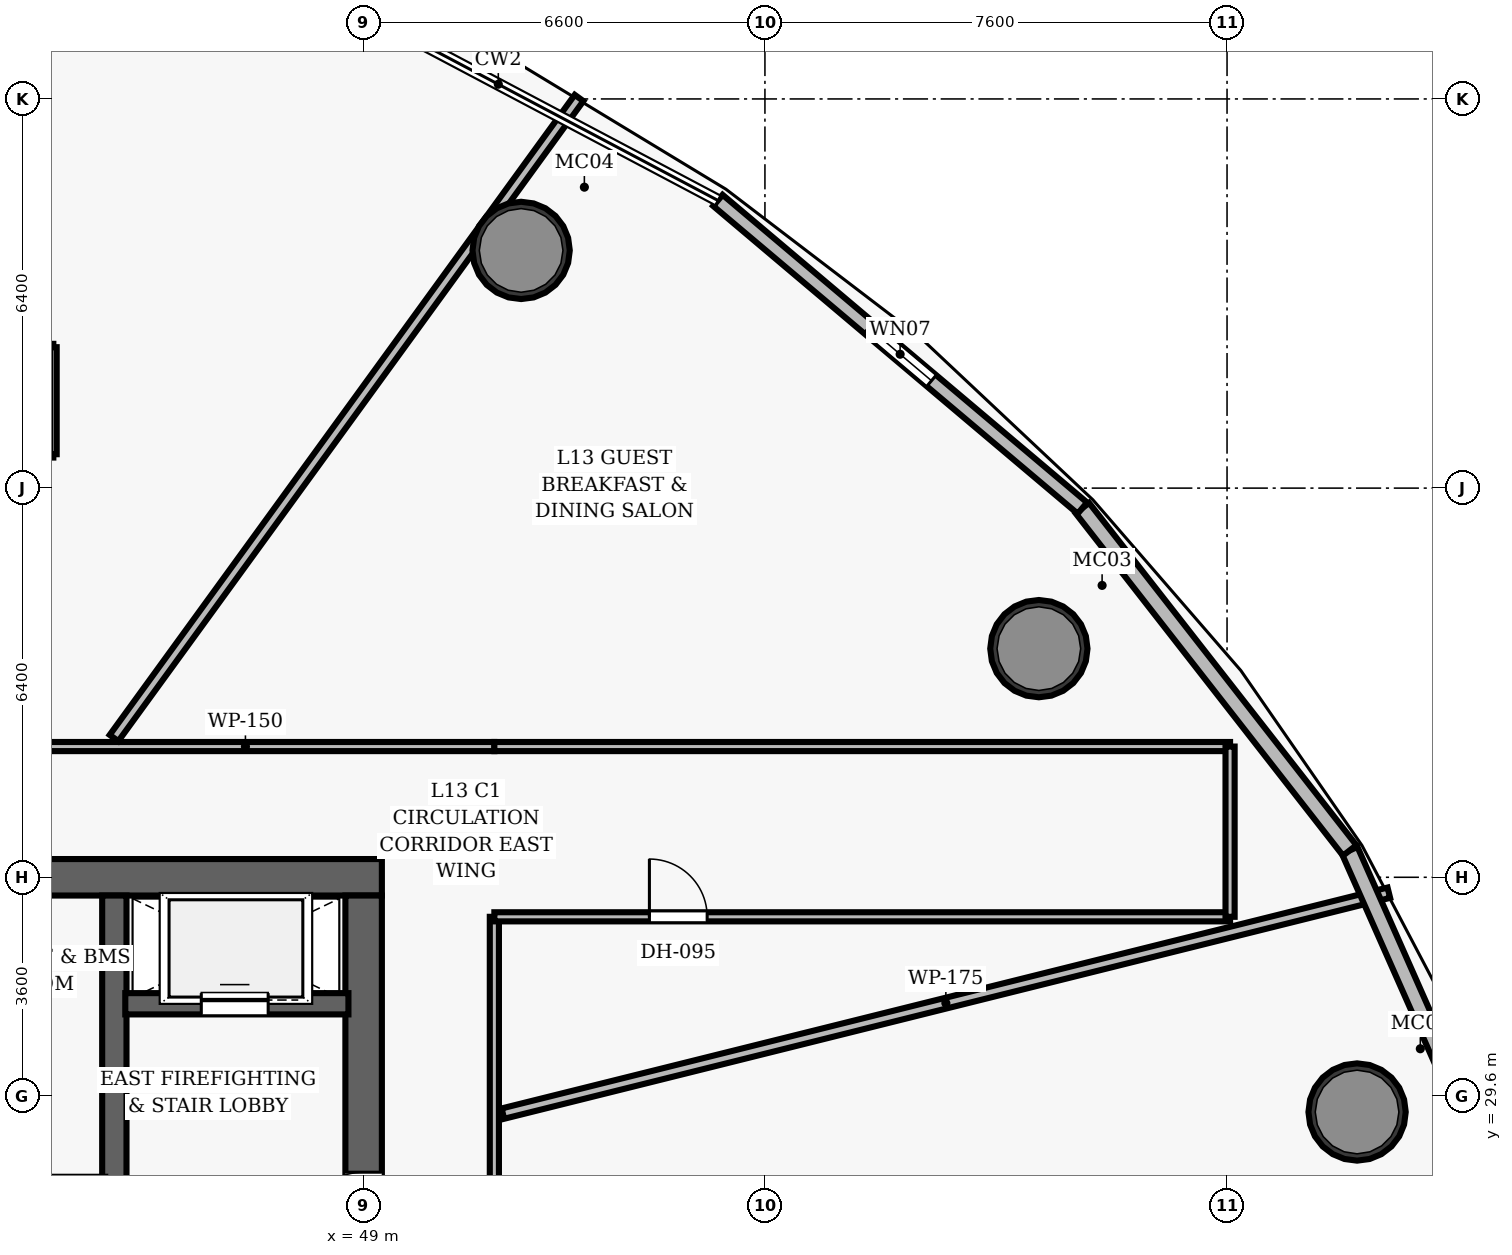
"""IFC4 building model, lengths in metres.
Left out: names, types, materials, properties, quantities, classifications, styles, units other than length and angle.
Written with IfcOpenShell. Run it as: python <this file> out.ifc"""

import sys

from ifc_helpers import new_model, si_unit, direction, frame, frame_2d, origin, origin_2d, place, context, subcontext, project, spatial, rectangle, hollow_circle, extrude, element, fill, save


model = new_model("IFC4")
c1 = context("Model", 3, precision=1e-05, world=origin(), true_north=direction((0.0, 1.0)))
c2 = subcontext(c1, "Body", "Model", "MODEL_VIEW")
j1 = project(units=[si_unit("LENGTHUNIT", "METRE"), si_unit("PLANEANGLEUNIT", "RADIAN")], contexts=[c1])
p1 = place(None, origin())
s1 = spatial("IfcSite", under=j1, at=p1, CompositionType="ELEMENT")
p2 = place(p1, origin())
s2 = spatial("IfcBuilding", under=s1, at=p2, CompositionType="ELEMENT")
p3 = place(p2, frame((0.0, 0.0, 62.4)))
s3 = spatial("IfcBuildingStorey", under=s2, at=p3, CompositionType="ELEMENT", Elevation=62.4)
p4 = place(p3, frame((26.7, 33.2, 0.0), z_axis=(0.0, 0.0, 1.0), x_axis=(1.0, 0.0, 0.0)))
e1 = element("IfcWall", 1, at=p4, inside=s3, PredefinedType="SHEAR", context=c2, shape_type="SweptSolid", body=[
    extrude(rectangle(XDim=22.6, YDim=0.6, at=frame_2d((11.3, 0.0))), origin(), (0.0, 0.0, 1.0), 3.5),
])
p5 = place(p4, frame((4.62, 0.0, 0.0)))
e2 = element("IfcOpeningElement", 2, at=p5, cuts=e1, PredefinedType="OPENING", context=c2, shape_type="SweptSolid", body=[
    extrude(rectangle(XDim=1.05, YDim=2.15, at=frame_2d((0.525, 1.075))), frame((0.0, 0.31, 0.0), z_axis=(0.0, -1.0, 0.0), x_axis=(1.0, 0.0, 0.0)), (0.0, 0.0, 1.0), 0.62),
])
p6 = place(p4, frame((14.52, 0.0, 0.0)))
e3 = element("IfcOpeningElement", 3, at=p6, cuts=e1, PredefinedType="OPENING", context=c2, shape_type="SweptSolid", body=[
    extrude(rectangle(XDim=1.05, YDim=2.15, at=frame_2d((0.525, 1.075))), frame((0.0, 0.31, 0.0), z_axis=(0.0, -1.0, 0.0), x_axis=(1.0, 0.0, 0.0)), (0.0, 0.0, 1.0), 0.62),
])
p7 = place(p3, frame((49.0, 19.1, 0.0), z_axis=(0.0, 0.0, 1.0), x_axis=(0.0, 1.0, 0.0)))
e4 = element("IfcWall", 4, at=p7, inside=s3, PredefinedType="SHEAR", context=c2, shape_type="SweptSolid", body=[
    extrude(rectangle(XDim=13.8, YDim=0.6, at=frame_2d((6.9, 0.0))), origin(), (0.0, 0.0, 1.0), 3.5),
])
p8 = place(p7, frame((8.2, 0.0, 0.0)))
e5 = element("IfcOpeningElement", 5, at=p8, cuts=e4, PredefinedType="OPENING", context=c2, shape_type="SweptSolid", body=[
    extrude(rectangle(XDim=1.05, YDim=2.15, at=frame_2d((0.525, 1.075))), frame((0.0, 0.31, 0.0), z_axis=(0.0, -1.0, 0.0), x_axis=(1.0, 0.0, 0.0)), (0.0, 0.0, 1.0), 0.62),
])
p9 = place(p3, frame((44.9, 19.1, 0.0), z_axis=(0.0, 0.0, 1.0), x_axis=(0.0, 1.0, 0.0)))
e6 = element("IfcWall", 6, at=p9, inside=s3, PredefinedType="SHEAR", context=c2, shape_type="SweptSolid", body=[
    extrude(rectangle(XDim=13.8, YDim=0.4, at=frame_2d((6.9, 0.0))), origin(), (0.0, 0.0, 1.0), 3.5),
])
for number, where, z_axis, x_axis in (
    (7, (65.339, 29.34, 0.0), (0.0, 0.0, 1.0), (1.0, 0.0, 0.0)),
    (8, (60.105, 36.96, 0.0), (0.0, 0.0, 1.0), (1.0, 0.0, 0.0)),
    (9, (51.59, 43.509, 0.0), (0.0, 0.0, 1.0), (1.0, 0.0, 0.0)),
):
    element("IfcColumn", number, at=place(p3, frame(where, z_axis=z_axis, x_axis=x_axis)), inside=s3, PredefinedType="COLUMN", context=c2, shape_type="SweptSolid", body=[
        extrude(hollow_circle(Radius=0.8, WallThickness=0.06, at=origin_2d()), origin(), (0.0, 0.0, 1.0), 3.5),
    ])
p10 = place(p3, frame((45.08, 31.12, 0.0), z_axis=(0.0, 0.0, 1.0), x_axis=(1.0, 0.0, 0.0)))
e10 = element("IfcWall", 10, at=p10, inside=s3, PredefinedType="SHEAR", context=c2, shape_type="SweptSolid", body=[
    extrude(rectangle(XDim=3.67, YDim=0.35, at=frame_2d((1.835, 0.0))), origin(), (0.0, 0.0, 1.0), 2.6),
])
p11 = place(p10, frame((1.25, 0.0, 0.0)))
e11 = element("IfcOpeningElement", 11, at=p11, cuts=e10, PredefinedType="OPENING", context=c2, shape_type="SweptSolid", body=[
    extrude(rectangle(XDim=1.1, YDim=2.15, at=frame_2d((0.55, 1.075))), frame((0.0, 0.185, 0.0), z_axis=(0.0, -1.0, 0.0), x_axis=(1.0, 0.0, 0.0)), (0.0, 0.0, 1.0), 0.37),
])
p12 = place(p3, frame((27.65, 35.35, 0.0), z_axis=(0.0, 0.0, 1.0), x_axis=(1.0, 0.0, 0.0)))
e12 = element("IfcWall", 12, at=p12, inside=s3, PredefinedType="PARTITIONING", context=c2, shape_type="SweptSolid", body=[
    extrude(rectangle(XDim=23.5, YDim=0.15, at=frame_2d((11.75, 0.0))), origin(), (0.0, 0.0, 1.0), 2.6),
])
p13 = place(p12, frame((14.212, 0.0, 0.0)))
e13 = element("IfcOpeningElement", 13, at=p13, cuts=e12, PredefinedType="OPENING", context=c2, shape_type="SweptSolid", body=[
    extrude(rectangle(XDim=0.95, YDim=2.15, at=frame_2d((0.475, 1.075))), frame((0.0, 0.085, 0.0), z_axis=(0.0, -1.0, 0.0), x_axis=(1.0, 0.0, 0.0)), (0.0, 0.0, 1.0), 0.17),
])
p14 = place(p12, frame((7.232, 0.0, 0.0)))
e14 = element("IfcOpeningElement", 14, at=p14, cuts=e12, PredefinedType="OPENING", context=c2, shape_type="SweptSolid", body=[
    extrude(rectangle(XDim=0.95, YDim=2.15, at=frame_2d((0.475, 1.075))), frame((0.0, 0.085, 0.0), z_axis=(0.0, -1.0, 0.0), x_axis=(1.0, 0.0, 0.0)), (0.0, 0.0, 1.0), 0.17),
])
p15 = place(p3, frame((51.15, 16.65, 0.0), z_axis=(0.0, 0.0, 1.0), x_axis=(0.0, 1.0, 0.0)))
e15 = element("IfcWall", 15, at=p15, inside=s3, PredefinedType="PARTITIONING", context=c2, shape_type="SweptSolid", body=[
    extrude(rectangle(XDim=15.9, YDim=0.15, at=frame_2d((7.95, 0.0))), origin(), (0.0, 0.0, 1.0), 2.6),
])
p16 = place(p15, frame((7.292, 0.0, 0.0)))
e16 = element("IfcOpeningElement", 16, at=p16, cuts=e15, PredefinedType="OPENING", context=c2, shape_type="SweptSolid", body=[
    extrude(rectangle(XDim=0.95, YDim=2.15, at=frame_2d((0.475, 1.075))), frame((0.0, 0.085, 0.0), z_axis=(0.0, -1.0, 0.0), x_axis=(1.0, 0.0, 0.0)), (0.0, 0.0, 1.0), 0.17),
])
p17 = place(p3, frame((51.15, 35.35, 0.0), z_axis=(0.0, 0.0, 1.0), x_axis=(1.0, 0.0, 0.0)))
e17 = element("IfcWall", 17, at=p17, inside=s3, PredefinedType="PARTITIONING", context=c2, shape_type="SweptSolid", body=[
    extrude(rectangle(XDim=12.1, YDim=0.15, at=frame_2d((6.05, 0.0))), origin(), (0.0, 0.0, 1.0), 2.6),
])
p18 = place(p3, frame((51.15, 32.55, 0.0), z_axis=(0.0, 0.0, 1.0), x_axis=(1.0, 0.0, 0.0)))
e18 = element("IfcWall", 18, at=p18, inside=s3, PredefinedType="PARTITIONING", context=c2, shape_type="SweptSolid", body=[
    extrude(rectangle(XDim=12.1, YDim=0.15, at=frame_2d((6.05, 0.0))), origin(), (0.0, 0.0, 1.0), 2.6),
])
p19 = place(p18, frame((2.55, 0.0, 0.0)))
e19 = element("IfcOpeningElement", 19, at=p19, cuts=e18, PredefinedType="OPENING", context=c2, shape_type="SweptSolid", body=[
    extrude(rectangle(XDim=0.95, YDim=2.15, at=frame_2d((0.475, 1.075))), frame((0.0, 0.085, 0.0), z_axis=(0.0, -1.0, 0.0), x_axis=(1.0, 0.0, 0.0)), (0.0, 0.0, 1.0), 0.17),
])
p20 = place(p3, frame((63.25, 32.55, 0.0), z_axis=(0.0, 0.0, 1.0), x_axis=(0.0, 1.0, 0.0)))
e20 = element("IfcWall", 20, at=p20, inside=s3, PredefinedType="PARTITIONING", context=c2, shape_type="SweptSolid", body=[
    extrude(rectangle(XDim=2.8, YDim=0.15, at=frame_2d((1.4, 0.0))), origin(), (0.0, 0.0, 1.0), 2.6),
])
p21 = place(p3, frame((51.29, 29.314, 0.0), z_axis=(0.0, 0.0, 1.0), x_axis=(0.970298180797, 0.24191205084, 0.0)))
e21 = element("IfcWall", 21, at=p21, inside=s3, PredefinedType="PARTITIONING", context=c2, shape_type="SweptSolid", body=[
    extrude(rectangle(XDim=15.017, YDim=0.175, at=frame_2d((7.509, 0.0))), origin(), (0.0, 0.0, 1.0), 2.6),
])
p22 = place(p3, frame((44.895, 35.49, 0.0), z_axis=(0.0, 0.0, 1.0), x_axis=(0.587777789809, 0.809022416134, 0.0)))
e22 = element("IfcWall", 22, at=p22, inside=s3, PredefinedType="PARTITIONING", context=c2, shape_type="SweptSolid", body=[
    extrude(rectangle(XDim=13.011, YDim=0.175, at=frame_2d((6.506, 0.0))), origin(), (0.0, 0.0, 1.0), 2.6),
])
p23 = place(p3, frame((41.697, 40.158, 0.0), z_axis=(0.0, 0.0, 1.0), x_axis=(1.0, 0.0, 0.0)))
e23 = element("IfcWall", 23, at=p23, inside=s3, PredefinedType="PARTITIONING", context=c2, shape_type="SweptSolid", body=[
    extrude(rectangle(XDim=2.2, YDim=0.11, at=frame_2d((1.1, 0.0))), origin(), (0.0, 0.0, 1.0), 2.6),
])
p24 = place(p3, frame((41.697, 41.917, 0.0), z_axis=(0.0, 0.0, 1.0), x_axis=(1.0, 0.0, 0.0)))
e24 = element("IfcWall", 24, at=p24, inside=s3, PredefinedType="PARTITIONING", context=c2, shape_type="SweptSolid", body=[
    extrude(rectangle(XDim=2.2, YDim=0.11, at=frame_2d((1.1, 0.0))), origin(), (0.0, 0.0, 1.0), 2.6),
])
p25 = place(p24, frame((0.68, 0.0, 0.0)))
e25 = element("IfcOpeningElement", 25, at=p25, cuts=e24, PredefinedType="OPENING", context=c2, shape_type="SweptSolid", body=[
    extrude(rectangle(XDim=0.85, YDim=2.1, at=frame_2d((0.425, 1.05))), frame((0.0, 0.065, 0.0), z_axis=(0.0, -1.0, 0.0), x_axis=(1.0, 0.0, 0.0)), (0.0, 0.0, 1.0), 0.13),
])
p26 = place(p3, frame((43.897, 40.158, 0.0), z_axis=(0.0, 0.0, 1.0), x_axis=(0.0, 1.0, 0.0)))
e26 = element("IfcWall", 26, at=p26, inside=s3, PredefinedType="PARTITIONING", context=c2, shape_type="SweptSolid", body=[
    extrude(rectangle(XDim=1.76, YDim=0.11, at=frame_2d((0.88, 0.0))), origin(), (0.0, 0.0, 1.0), 2.6),
])
p27 = place(p3, frame((65.217, 33.642, 0.0), z_axis=(0.0, 0.0, 1.0), x_axis=(0.40466845828, -0.914463470497, 0.0)))
e27 = element("IfcWall", 27, at=p27, inside=s3, PredefinedType="SOLIDWALL", context=c2, shape_type="SweptSolid", body=[
    extrude(rectangle(XDim=6.212, YDim=0.28, at=frame_2d((3.106, 0.0))), origin(), (0.0, 0.0, 1.0), 3.25),
])
p28 = place(p3, frame((60.821, 39.271, 0.0), z_axis=(0.0, 0.0, 1.0), x_axis=(0.615515355717, -0.788124892943, 0.0)))
e28 = element("IfcWall", 28, at=p28, inside=s3, PredefinedType="SOLIDWALL", context=c2, shape_type="SweptSolid", body=[
    extrude(rectangle(XDim=7.143, YDim=0.28, at=frame_2d((3.571, 0.0))), origin(), (0.0, 0.0, 1.0), 3.25),
])
p29 = place(p3, frame((54.826, 44.332, 0.0), z_axis=(0.0, 0.0, 1.0), x_axis=(0.764144788542, -0.645044759799, 0.0)))
e29 = element("IfcWall", 29, at=p29, inside=s3, PredefinedType="SOLIDWALL", context=c2, shape_type="SweptSolid", body=[
    extrude(rectangle(XDim=7.845, YDim=0.24, at=frame_2d((3.922, 0.0))), origin(), (0.0, 0.0, 1.0), 3.25),
])
p30 = place(p29, frame((3.247, 0.0, 0.85)))
e30 = element("IfcOpeningElement", 30, at=p30, cuts=e29, PredefinedType="OPENING", context=c2, shape_type="SweptSolid", body=[
    extrude(rectangle(XDim=1.35, YDim=1.65, at=frame_2d((0.675, 0.825))), frame((0.0, 0.13, 0.0), z_axis=(0.0, -1.0, 0.0), x_axis=(1.0, 0.0, 0.0)), (0.0, 0.0, 1.0), 0.26),
])
p31 = place(p8, origin())
e31 = element("IfcDoor", 31, at=p31, inside=s3, OperationType="SINGLE_SWING_LEFT", PredefinedType="DOOR", context=c2, shape_type="SweptSolid", body=[
    extrude(rectangle(XDim=1.05, YDim=2.15, at=frame_2d((0.525, 1.075))), frame((0.0, 0.025, 0.0), z_axis=(0.0, -1.0, 0.0), x_axis=(1.0, 0.0, 0.0)), (0.0, 0.0, 1.0), 0.05),
])
fill(e5, e31)
p32 = place(p19, origin())
e32 = element("IfcDoor", 32, at=p32, inside=s3, OperationType="SINGLE_SWING_LEFT", PredefinedType="DOOR", context=c2, shape_type="SweptSolid", body=[
    extrude(rectangle(XDim=0.95, YDim=2.15, at=frame_2d((0.475, 1.075))), frame((0.0, 0.025, 0.0), z_axis=(0.0, -1.0, 0.0), x_axis=(1.0, 0.0, 0.0)), (0.0, 0.0, 1.0), 0.05),
])
fill(e19, e32)
p33 = place(p11, origin())
e33 = element("IfcDoor", 33, at=p33, inside=s3, OperationType="SLIDING_TO_LEFT", PredefinedType="DOOR", context=c2, shape_type="SweptSolid", body=[
    extrude(rectangle(XDim=1.1, YDim=2.15, at=frame_2d((0.55, 1.075))), frame((0.0, 0.025, 0.0), z_axis=(0.0, -1.0, 0.0), x_axis=(1.0, 0.0, 0.0)), (0.0, 0.0, 1.0), 0.05),
])
fill(e11, e33)
p34 = place(p30, origin())
e34 = element("IfcWindow", 34, at=p34, inside=s3, PartitioningType="SINGLE_PANEL", PredefinedType="WINDOW", context=c2, shape_type="SweptSolid", body=[
    extrude(rectangle(XDim=1.35, YDim=1.65, at=frame_2d((0.675, 0.825))), frame((0.0, 0.03, 0.0), z_axis=(0.0, -1.0, 0.0), x_axis=(1.0, 0.0, 0.0)), (0.0, 0.0, 1.0), 0.06),
])
fill(e30, e34)
save(model, sys.argv[1])
